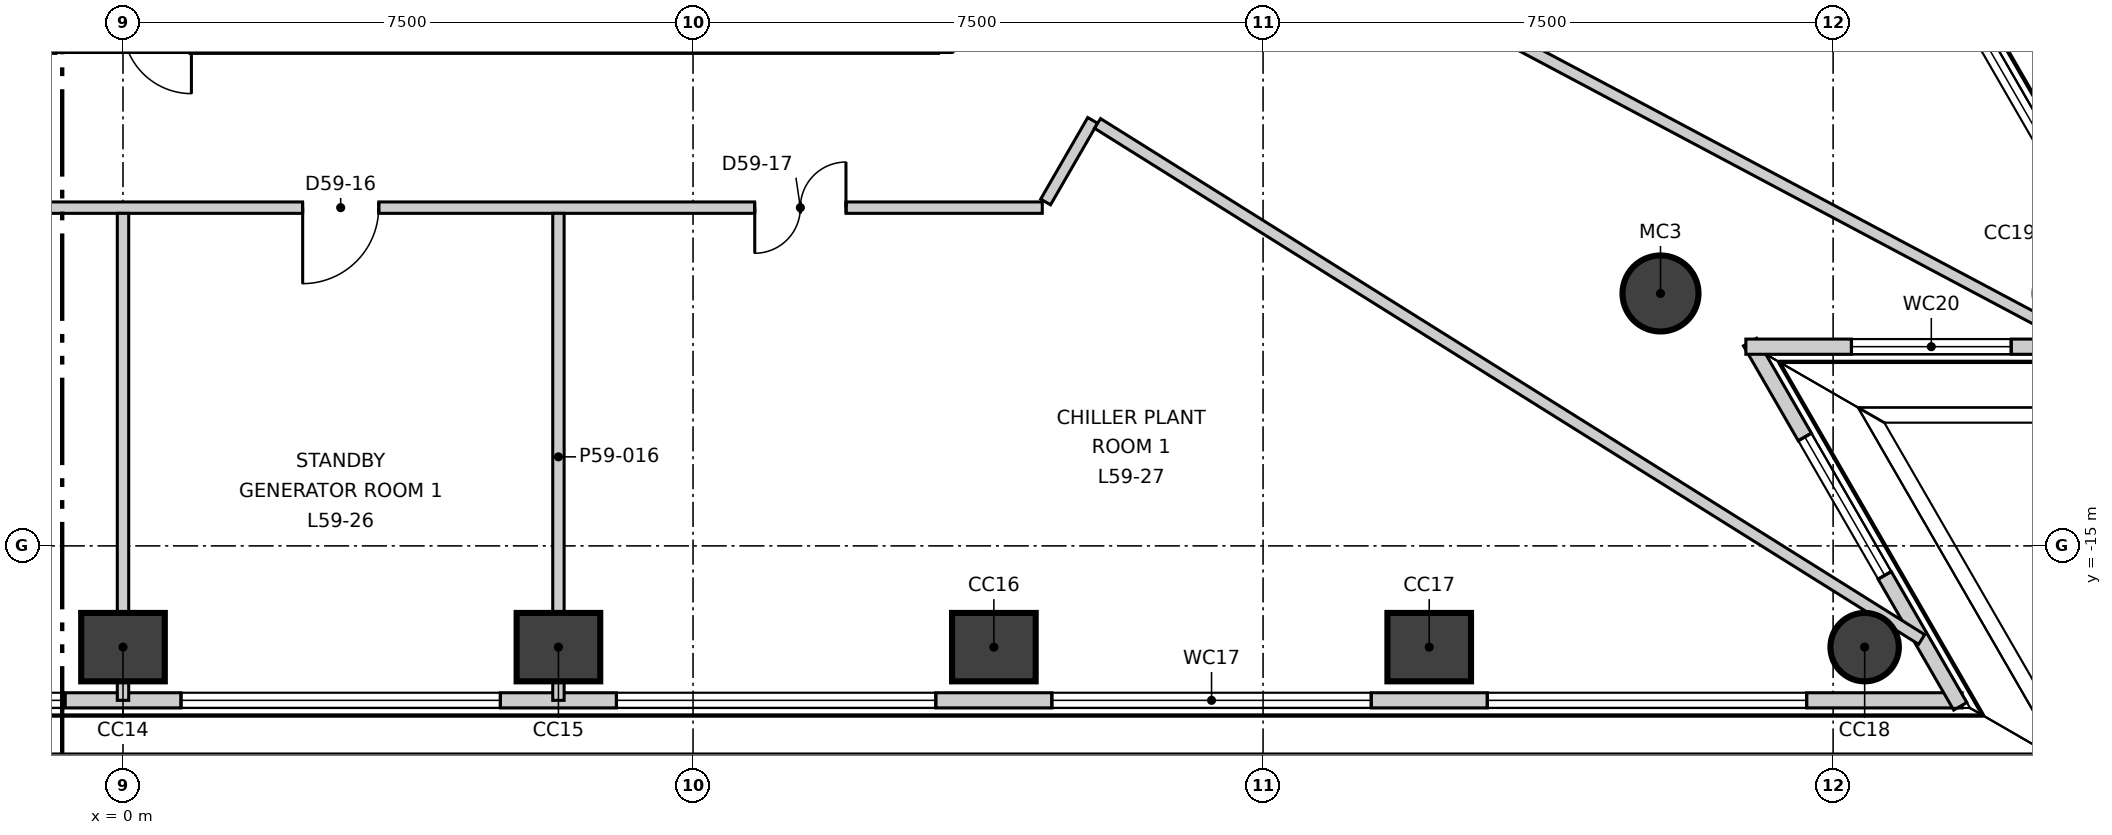
"""IFC4 building model, lengths in metres.
Left out: names, types, materials, properties, quantities, classifications, styles, units other than length and angle.
Written with IfcOpenShell. Run it as: python <this file> out.ifc"""

import sys

from ifc_helpers import new_model, si_unit, direction, frame, frame_2d, origin, origin_2d, place, context, subcontext, project, spatial, rectangle, circle, extrude, element, fill, save


model = new_model("IFC4")
c1 = context("Model", 3, precision=1e-05, world=origin(), true_north=direction((0.0, 1.0)))
c2 = subcontext(c1, "Body", "Model", "MODEL_VIEW")
j1 = project(units=[si_unit("LENGTHUNIT", "METRE"), si_unit("PLANEANGLEUNIT", "RADIAN")], contexts=[c1])
p1 = place(None, origin())
s1 = spatial("IfcSite", under=j1, at=p1, CompositionType="ELEMENT")
p2 = place(p1, origin())
s2 = spatial("IfcBuilding", under=s1, at=p2, CompositionType="ELEMENT")
p3 = place(p2, frame((0.0, 0.0, 251.3)))
s3 = spatial("IfcBuildingStorey", under=s2, at=p3, CompositionType="ELEMENT", Elevation=251.3)
for number, where, z_axis, x_axis in (
    (1, (0.0, -16.332, -0.3), (0.0, 0.0, 1.0), (1.0, 0.0, 0.0)),
    (2, (5.729, -16.332, -0.3), (0.0, 0.0, 1.0), (1.0, 0.0, 0.0)),
    (3, (11.458, -16.332, -0.3), (0.0, 0.0, 1.0), (1.0, 0.0, 0.0)),
    (4, (17.186, -16.332, -0.3), (0.0, 0.0, 1.0), (1.0, 0.0, 0.0)),
):
    element("IfcColumn", number, at=place(p3, frame(where, z_axis=z_axis, x_axis=x_axis)), inside=s3, PredefinedType="COLUMN", context=c2, shape_type="SweptSolid", body=[
        extrude(rectangle(XDim=1.1, YDim=0.9, at=origin_2d()), origin(), (0.0, 0.0, 1.0), 4.2),
    ])
p4 = place(p3, frame((22.915, -16.332, -0.3), z_axis=(0.0, 0.0, 1.0), x_axis=(1.0, 0.0, 0.0)))
e5 = element("IfcColumn", 5, at=p4, inside=s3, PredefinedType="COLUMN", context=c2, shape_type="SweptSolid", body=[
    extrude(circle(Radius=0.45, at=origin_2d()), origin(), (0.0, 0.0, 1.0), 4.2),
])
p5 = place(p3, frame((20.229, -11.679, -0.3), z_axis=(0.0, 0.0, 1.0), x_axis=(1.0, 0.0, 0.0)))
e6 = element("IfcColumn", 6, at=p5, inside=s3, PredefinedType="COLUMN", context=c2, shape_type="SweptSolid", body=[
    extrude(circle(Radius=0.5, at=origin_2d()), origin(), (0.0, 0.0, 1.0), 4.2),
])
p6 = place(p3, frame((-24.218, -17.032, 0.0), z_axis=(0.0, 0.0, 1.0), x_axis=(1.0, 0.0, 0.0)))
e7 = element("IfcWall", 7, at=p6, inside=s3, PredefinedType="ELEMENTEDWALL", context=c2, shape_type="SweptSolid", body=[
    extrude(rectangle(XDim=48.416, YDim=0.2, at=frame_2d((24.208, 0.0))), origin(), (0.0, 0.0, 1.0), 3.9),
])
p7 = place(p6, frame((2.067, 0.0, 0.9)))
e8 = element("IfcOpeningElement", 8, at=p7, cuts=e7, PredefinedType="OPENING", context=c2, shape_type="SweptSolid", body=[
    extrude(rectangle(XDim=4.2, YDim=2.5, at=frame_2d((2.1, 1.25))), frame((0.0, 0.11, 0.0), z_axis=(0.0, -1.0, 0.0), x_axis=(1.0, 0.0, 0.0)), (0.0, 0.0, 1.0), 0.22),
])
p8 = place(p6, frame((7.796, 0.0, 0.9)))
e9 = element("IfcOpeningElement", 9, at=p8, cuts=e7, PredefinedType="OPENING", context=c2, shape_type="SweptSolid", body=[
    extrude(rectangle(XDim=4.2, YDim=2.5, at=frame_2d((2.1, 1.25))), frame((0.0, 0.11, 0.0), z_axis=(0.0, -1.0, 0.0), x_axis=(1.0, 0.0, 0.0)), (0.0, 0.0, 1.0), 0.22),
])
p9 = place(p6, frame((13.525, 0.0, 0.9)))
e10 = element("IfcOpeningElement", 10, at=p9, cuts=e7, PredefinedType="OPENING", context=c2, shape_type="SweptSolid", body=[
    extrude(rectangle(XDim=4.2, YDim=2.5, at=frame_2d((2.1, 1.25))), frame((0.0, 0.11, 0.0), z_axis=(0.0, -1.0, 0.0), x_axis=(1.0, 0.0, 0.0)), (0.0, 0.0, 1.0), 0.22),
])
p10 = place(p6, frame((19.254, 0.0, 0.9)))
e11 = element("IfcOpeningElement", 11, at=p10, cuts=e7, PredefinedType="OPENING", context=c2, shape_type="SweptSolid", body=[
    extrude(rectangle(XDim=4.2, YDim=2.5, at=frame_2d((2.1, 1.25))), frame((0.0, 0.11, 0.0), z_axis=(0.0, -1.0, 0.0), x_axis=(1.0, 0.0, 0.0)), (0.0, 0.0, 1.0), 0.22),
])
p11 = place(p6, frame((24.982, 0.0, 0.9)))
e12 = element("IfcOpeningElement", 12, at=p11, cuts=e7, PredefinedType="OPENING", context=c2, shape_type="SweptSolid", body=[
    extrude(rectangle(XDim=4.2, YDim=2.5, at=frame_2d((2.1, 1.25))), frame((0.0, 0.11, 0.0), z_axis=(0.0, -1.0, 0.0), x_axis=(1.0, 0.0, 0.0)), (0.0, 0.0, 1.0), 0.22),
])
p12 = place(p6, frame((30.711, 0.0, 0.9)))
e13 = element("IfcOpeningElement", 13, at=p12, cuts=e7, PredefinedType="OPENING", context=c2, shape_type="SweptSolid", body=[
    extrude(rectangle(XDim=4.2, YDim=2.5, at=frame_2d((2.1, 1.25))), frame((0.0, 0.11, 0.0), z_axis=(0.0, -1.0, 0.0), x_axis=(1.0, 0.0, 0.0)), (0.0, 0.0, 1.0), 0.22),
])
p13 = place(p6, frame((36.44, 0.0, 0.9)))
e14 = element("IfcOpeningElement", 14, at=p13, cuts=e7, PredefinedType="OPENING", context=c2, shape_type="SweptSolid", body=[
    extrude(rectangle(XDim=4.2, YDim=2.5, at=frame_2d((2.1, 1.25))), frame((0.0, 0.11, 0.0), z_axis=(0.0, -1.0, 0.0), x_axis=(1.0, 0.0, 0.0)), (0.0, 0.0, 1.0), 0.22),
])
p14 = place(p6, frame((42.169, 0.0, 0.9)))
e15 = element("IfcOpeningElement", 15, at=p14, cuts=e7, PredefinedType="OPENING", context=c2, shape_type="SweptSolid", body=[
    extrude(rectangle(XDim=4.2, YDim=2.5, at=frame_2d((2.1, 1.25))), frame((0.0, 0.11, 0.0), z_axis=(0.0, -1.0, 0.0), x_axis=(1.0, 0.0, 0.0)), (0.0, 0.0, 1.0), 0.22),
])
p15 = place(p3, frame((24.173, -17.11, 0.0), z_axis=(0.0, 0.0, 1.0), x_axis=(-0.499926164748, 0.866068028391, 0.0)))
e16 = element("IfcWall", 16, at=p15, inside=s3, PredefinedType="ELEMENTEDWALL", context=c2, shape_type="SweptSolid", body=[
    extrude(rectangle(XDim=5.533, YDim=0.2, at=frame_2d((2.767, 0.0))), origin(), (0.0, 0.0, 1.0), 3.9),
])
p16 = place(p15, frame((1.99, 0.0, 0.9)))
e17 = element("IfcOpeningElement", 17, at=p16, cuts=e16, PredefinedType="OPENING", context=c2, shape_type="SweptSolid", body=[
    extrude(rectangle(XDim=2.1, YDim=2.5, at=frame_2d((1.05, 1.25))), frame((0.0, 0.11, 0.0), z_axis=(0.0, -1.0, 0.0), x_axis=(1.0, 0.0, 0.0)), (0.0, 0.0, 1.0), 0.22),
])
p17 = place(p3, frame((21.352, -12.379, 0.0), z_axis=(0.0, 0.0, 1.0), x_axis=(1.0, 0.0, 0.0)))
e18 = element("IfcWall", 18, at=p17, inside=s3, PredefinedType="ELEMENTEDWALL", context=c2, shape_type="SweptSolid", body=[
    extrude(rectangle(XDim=5.532, YDim=0.2, at=frame_2d((2.766, 0.0))), origin(), (0.0, 0.0, 1.0), 3.9),
])
p18 = place(p17, frame((1.39, 0.0, 0.9)))
e19 = element("IfcOpeningElement", 19, at=p18, cuts=e18, PredefinedType="OPENING", context=c2, shape_type="SweptSolid", body=[
    extrude(rectangle(XDim=2.1, YDim=2.5, at=frame_2d((1.05, 1.25))), frame((0.0, 0.11, 0.0), z_axis=(0.0, -1.0, 0.0), x_axis=(1.0, 0.0, 0.0)), (0.0, 0.0, 1.0), 0.22),
])
p19 = place(p3, frame((26.859, -12.457, 0.0), z_axis=(0.0, 0.0, 1.0), x_axis=(-0.500004868955, 0.866022592674, 0.0)))
e20 = element("IfcWall", 20, at=p19, inside=s3, PredefinedType="ELEMENTEDWALL", context=c2, shape_type="SweptSolid", body=[
    extrude(rectangle(XDim=48.416, YDim=0.2, at=frame_2d((24.208, 0.0))), origin(), (0.0, 0.0, 1.0), 3.9),
])
p20 = place(p19, frame((2.067, 0.0, 0.9)))
e21 = element("IfcOpeningElement", 21, at=p20, cuts=e20, PredefinedType="OPENING", context=c2, shape_type="SweptSolid", body=[
    extrude(rectangle(XDim=4.2, YDim=2.5, at=frame_2d((2.1, 1.25))), frame((0.0, 0.11, 0.0), z_axis=(0.0, -1.0, 0.0), x_axis=(1.0, 0.0, 0.0)), (0.0, 0.0, 1.0), 0.22),
])
p21 = place(p19, frame((7.796, 0.0, 0.9)))
e22 = element("IfcOpeningElement", 22, at=p21, cuts=e20, PredefinedType="OPENING", context=c2, shape_type="SweptSolid", body=[
    extrude(rectangle(XDim=4.2, YDim=2.5, at=frame_2d((2.1, 1.25))), frame((0.0, 0.11, 0.0), z_axis=(0.0, -1.0, 0.0), x_axis=(1.0, 0.0, 0.0)), (0.0, 0.0, 1.0), 0.22),
])
p22 = place(p19, frame((13.525, 0.0, 0.9)))
e23 = element("IfcOpeningElement", 23, at=p22, cuts=e20, PredefinedType="OPENING", context=c2, shape_type="SweptSolid", body=[
    extrude(rectangle(XDim=4.2, YDim=2.5, at=frame_2d((2.1, 1.25))), frame((0.0, 0.11, 0.0), z_axis=(0.0, -1.0, 0.0), x_axis=(1.0, 0.0, 0.0)), (0.0, 0.0, 1.0), 0.22),
])
p23 = place(p19, frame((19.253, 0.0, 0.9)))
e24 = element("IfcOpeningElement", 24, at=p23, cuts=e20, PredefinedType="OPENING", context=c2, shape_type="SweptSolid", body=[
    extrude(rectangle(XDim=4.2, YDim=2.5, at=frame_2d((2.1, 1.25))), frame((0.0, 0.11, 0.0), z_axis=(0.0, -1.0, 0.0), x_axis=(1.0, 0.0, 0.0)), (0.0, 0.0, 1.0), 0.22),
])
p24 = place(p19, frame((24.982, 0.0, 0.9)))
e25 = element("IfcOpeningElement", 25, at=p24, cuts=e20, PredefinedType="OPENING", context=c2, shape_type="SweptSolid", body=[
    extrude(rectangle(XDim=4.2, YDim=2.5, at=frame_2d((2.1, 1.25))), frame((0.0, 0.11, 0.0), z_axis=(0.0, -1.0, 0.0), x_axis=(1.0, 0.0, 0.0)), (0.0, 0.0, 1.0), 0.22),
])
p25 = place(p19, frame((30.711, 0.0, 0.9)))
e26 = element("IfcOpeningElement", 26, at=p25, cuts=e20, PredefinedType="OPENING", context=c2, shape_type="SweptSolid", body=[
    extrude(rectangle(XDim=4.2, YDim=2.5, at=frame_2d((2.1, 1.25))), frame((0.0, 0.11, 0.0), z_axis=(0.0, -1.0, 0.0), x_axis=(1.0, 0.0, 0.0)), (0.0, 0.0, 1.0), 0.22),
])
p26 = place(p19, frame((36.44, 0.0, 0.9)))
e27 = element("IfcOpeningElement", 27, at=p26, cuts=e20, PredefinedType="OPENING", context=c2, shape_type="SweptSolid", body=[
    extrude(rectangle(XDim=4.2, YDim=2.5, at=frame_2d((2.1, 1.25))), frame((0.0, 0.11, 0.0), z_axis=(0.0, -1.0, 0.0), x_axis=(1.0, 0.0, 0.0)), (0.0, 0.0, 1.0), 0.22),
])
p27 = place(p19, frame((42.168, 0.0, 0.9)))
e28 = element("IfcOpeningElement", 28, at=p27, cuts=e20, PredefinedType="OPENING", context=c2, shape_type="SweptSolid", body=[
    extrude(rectangle(XDim=4.2, YDim=2.5, at=frame_2d((2.1, 1.25))), frame((0.0, 0.11, 0.0), z_axis=(0.0, -1.0, 0.0), x_axis=(1.0, 0.0, 0.0)), (0.0, 0.0, 1.0), 0.22),
])
p28 = place(p3, frame((-12.009, -10.55, 0.0), z_axis=(0.0, 0.0, 1.0), x_axis=(1.0, 0.0, 0.0)))
e29 = element("IfcWall", 29, at=p28, inside=s3, PredefinedType="PARTITIONING", context=c2, shape_type="SweptSolid", body=[
    extrude(rectangle(XDim=24.104, YDim=0.15, at=frame_2d((12.052, 0.0))), origin(), (0.0, 0.0, 1.0), 3.9),
])
p29 = place(p28, frame((2.497, 0.0, 0.0)))
e30 = element("IfcOpeningElement", 30, at=p29, cuts=e29, PredefinedType="OPENING", context=c2, shape_type="SweptSolid", body=[
    extrude(rectangle(XDim=1.2, YDim=2.1, at=frame_2d((0.6, 1.05))), frame((0.0, 0.085, 0.0), z_axis=(0.0, -1.0, 0.0), x_axis=(1.0, 0.0, 0.0)), (0.0, 0.0, 1.0), 0.17),
])
p30 = place(p28, frame((8.644, 0.0, 0.0)))
e31 = element("IfcOpeningElement", 31, at=p30, cuts=e29, PredefinedType="OPENING", context=c2, shape_type="SweptSolid", body=[
    extrude(rectangle(XDim=1.0, YDim=2.1, at=frame_2d((0.5, 1.05))), frame((0.0, 0.085, 0.0), z_axis=(0.0, -1.0, 0.0), x_axis=(1.0, 0.0, 0.0)), (0.0, 0.0, 1.0), 0.17),
])
p31 = place(p28, frame((14.373, 0.0, 0.0)))
e32 = element("IfcOpeningElement", 32, at=p31, cuts=e29, PredefinedType="OPENING", context=c2, shape_type="SweptSolid", body=[
    extrude(rectangle(XDim=1.0, YDim=2.1, at=frame_2d((0.5, 1.05))), frame((0.0, 0.085, 0.0), z_axis=(0.0, -1.0, 0.0), x_axis=(1.0, 0.0, 0.0)), (0.0, 0.0, 1.0), 0.17),
])
p32 = place(p28, frame((20.321, 0.0, 0.0)))
e33 = element("IfcOpeningElement", 33, at=p32, cuts=e29, PredefinedType="OPENING", context=c2, shape_type="SweptSolid", body=[
    extrude(rectangle(XDim=1.2, YDim=2.1, at=frame_2d((0.6, 1.05))), frame((0.0, 0.085, 0.0), z_axis=(0.0, -1.0, 0.0), x_axis=(1.0, 0.0, 0.0)), (0.0, 0.0, 1.0), 0.17),
])
p33 = place(p3, frame((0.0, -17.032, 0.0), z_axis=(0.0, 0.0, 1.0), x_axis=(0.0, 1.0, 0.0)))
e34 = element("IfcWall", 34, at=p33, inside=s3, PredefinedType="PARTITIONING", context=c2, shape_type="SweptSolid", body=[
    extrude(rectangle(XDim=6.407, YDim=0.15, at=frame_2d((3.204, 0.0))), origin(), (0.0, 0.0, 1.0), 3.4),
])
p34 = place(p3, frame((5.729, -17.032, 0.0), z_axis=(0.0, 0.0, 1.0), x_axis=(0.0, 1.0, 0.0)))
e35 = element("IfcWall", 35, at=p34, inside=s3, PredefinedType="PARTITIONING", context=c2, shape_type="SweptSolid", body=[
    extrude(rectangle(XDim=6.407, YDim=0.15, at=frame_2d((3.204, 0.0))), origin(), (0.0, 0.0, 1.0), 3.9),
])
p35 = place(p3, frame((12.139, -10.475, 0.0), z_axis=(0.0, 0.0, 1.0), x_axis=(0.499785009086, 0.86614949327, 0.0)))
e36 = element("IfcWall", 36, at=p35, inside=s3, PredefinedType="PARTITIONING", context=c2, shape_type="SweptSolid", body=[
    extrude(rectangle(XDim=1.239, YDim=0.15, at=frame_2d((0.619, 0.0))), origin(), (0.0, 0.0, 1.0), 3.9),
])
p36 = place(p3, frame((12.822, -9.442, 0.0), z_axis=(0.0, 0.0, 1.0), x_axis=(0.847570249745, -0.530683212233, 0.0)))
e37 = element("IfcWall", 37, at=p36, inside=s3, PredefinedType="PARTITIONING", context=c2, shape_type="SweptSolid", body=[
    extrude(rectangle(XDim=12.793, YDim=0.15, at=frame_2d((6.396, 0.0))), origin(), (0.0, 0.0, 1.0), 3.3),
])
p37 = place(p3, frame((14.583, -6.391, 0.0), z_axis=(0.0, 0.0, 1.0), x_axis=(0.883096398923, -0.469191592219, 0.0)))
e38 = element("IfcWall", 38, at=p37, inside=s3, PredefinedType="PARTITIONING", context=c2, shape_type="SweptSolid", body=[
    extrude(rectangle(XDim=12.762, YDim=0.15, at=frame_2d((6.381, 0.0))), origin(), (0.0, 0.0, 1.0), 3.3),
])
p38 = place(p10, origin())
e39 = element("IfcWindow", 39, at=p38, inside=s3, PartitioningType="SINGLE_PANEL", PredefinedType="WINDOW", context=c2, shape_type="SweptSolid", body=[
    extrude(rectangle(XDim=4.2, YDim=2.5, at=frame_2d((2.1, 1.25))), frame((0.0, 0.03, 0.0), z_axis=(0.0, -1.0, 0.0), x_axis=(1.0, 0.0, 0.0)), (0.0, 0.0, 1.0), 0.06),
])
fill(e11, e39)
p39 = place(p11, origin())
e40 = element("IfcWindow", 40, at=p39, inside=s3, PartitioningType="SINGLE_PANEL", PredefinedType="WINDOW", context=c2, shape_type="SweptSolid", body=[
    extrude(rectangle(XDim=4.2, YDim=2.5, at=frame_2d((2.1, 1.25))), frame((0.0, 0.03, 0.0), z_axis=(0.0, -1.0, 0.0), x_axis=(1.0, 0.0, 0.0)), (0.0, 0.0, 1.0), 0.06),
])
fill(e12, e40)
p40 = place(p12, origin())
e41 = element("IfcWindow", 41, at=p40, inside=s3, PartitioningType="SINGLE_PANEL", PredefinedType="WINDOW", context=c2, shape_type="SweptSolid", body=[
    extrude(rectangle(XDim=4.2, YDim=2.5, at=frame_2d((2.1, 1.25))), frame((0.0, 0.03, 0.0), z_axis=(0.0, -1.0, 0.0), x_axis=(1.0, 0.0, 0.0)), (0.0, 0.0, 1.0), 0.06),
])
fill(e13, e41)
p41 = place(p13, origin())
e42 = element("IfcWindow", 42, at=p41, inside=s3, PartitioningType="SINGLE_PANEL", PredefinedType="WINDOW", context=c2, shape_type="SweptSolid", body=[
    extrude(rectangle(XDim=4.2, YDim=2.5, at=frame_2d((2.1, 1.25))), frame((0.0, 0.03, 0.0), z_axis=(0.0, -1.0, 0.0), x_axis=(1.0, 0.0, 0.0)), (0.0, 0.0, 1.0), 0.06),
])
fill(e14, e42)
p42 = place(p14, origin())
e43 = element("IfcWindow", 43, at=p42, inside=s3, PartitioningType="SINGLE_PANEL", PredefinedType="WINDOW", context=c2, shape_type="SweptSolid", body=[
    extrude(rectangle(XDim=4.2, YDim=2.5, at=frame_2d((2.1, 1.25))), frame((0.0, 0.03, 0.0), z_axis=(0.0, -1.0, 0.0), x_axis=(1.0, 0.0, 0.0)), (0.0, 0.0, 1.0), 0.06),
])
fill(e15, e43)
p43 = place(p16, origin())
e44 = element("IfcWindow", 44, at=p43, inside=s3, PartitioningType="SINGLE_PANEL", PredefinedType="WINDOW", context=c2, shape_type="SweptSolid", body=[
    extrude(rectangle(XDim=2.1, YDim=2.5, at=frame_2d((1.05, 1.25))), frame((0.0, 0.03, 0.0), z_axis=(0.0, -1.0, 0.0), x_axis=(1.0, 0.0, 0.0)), (0.0, 0.0, 1.0), 0.06),
])
fill(e17, e44)
p44 = place(p18, origin())
e45 = element("IfcWindow", 45, at=p44, inside=s3, PartitioningType="SINGLE_PANEL", PredefinedType="WINDOW", context=c2, shape_type="SweptSolid", body=[
    extrude(rectangle(XDim=2.1, YDim=2.5, at=frame_2d((1.05, 1.25))), frame((0.0, 0.03, 0.0), z_axis=(0.0, -1.0, 0.0), x_axis=(1.0, 0.0, 0.0)), (0.0, 0.0, 1.0), 0.06),
])
fill(e19, e45)
p45 = place(p20, origin())
e46 = element("IfcWindow", 46, at=p45, inside=s3, PartitioningType="SINGLE_PANEL", PredefinedType="WINDOW", context=c2, shape_type="SweptSolid", body=[
    extrude(rectangle(XDim=4.2, YDim=2.5, at=frame_2d((2.1, 1.25))), frame((0.0, 0.03, 0.0), z_axis=(0.0, -1.0, 0.0), x_axis=(1.0, 0.0, 0.0)), (0.0, 0.0, 1.0), 0.06),
])
fill(e21, e46)
p46 = place(p31, origin())
e47 = element("IfcDoor", 47, at=p46, inside=s3, OperationType="SINGLE_SWING_LEFT", PredefinedType="DOOR", context=c2, shape_type="SweptSolid", body=[
    extrude(rectangle(XDim=1.0, YDim=2.1, at=frame_2d((0.5, 1.05))), frame((0.0, 0.025, 0.0), z_axis=(0.0, -1.0, 0.0), x_axis=(1.0, 0.0, 0.0)), (0.0, 0.0, 1.0), 0.05),
])
fill(e32, e47)
p47 = place(p32, origin())
e48 = element("IfcDoor", 48, at=p47, inside=s3, OperationType="DOUBLE_DOOR_SINGLE_SWING", PredefinedType="DOOR", context=c2, shape_type="SweptSolid", body=[
    extrude(rectangle(XDim=1.2, YDim=2.1, at=frame_2d((0.6, 1.05))), frame((0.0, 0.025, 0.0), z_axis=(0.0, -1.0, 0.0), x_axis=(1.0, 0.0, 0.0)), (0.0, 0.0, 1.0), 0.05),
])
fill(e33, e48)
save(model, sys.argv[1])
